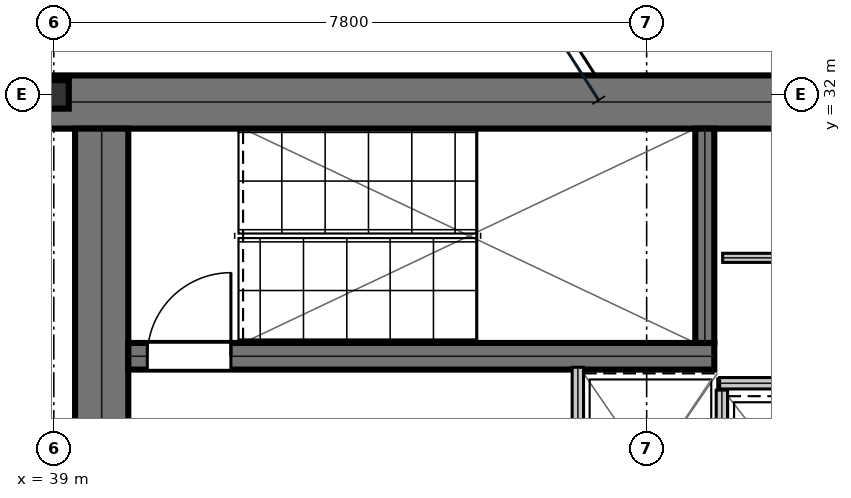
"""IFC4 building model, lengths in metres.
Left out: names, types, materials, properties, quantities, classifications, styles, units other than length and angle.
Written with IfcOpenShell. Run it as: python <this file> out.ifc"""

import sys

from ifc_helpers import new_model, si_unit, direction, frame, frame_2d, origin, origin_2d, place, context, subcontext, project, spatial, rectangle, i_section, extrude, element, fill, save


model = new_model("IFC4")
c1 = context("Model", 3, precision=1e-05, world=origin(), true_north=direction((0.0, 1.0)))
c2 = subcontext(c1, "Body", "Model", "MODEL_VIEW")
j1 = project(units=[si_unit("LENGTHUNIT", "METRE"), si_unit("PLANEANGLEUNIT", "RADIAN")], contexts=[c1])
p1 = place(None, origin())
s1 = spatial("IfcSite", under=j1, at=p1, CompositionType="ELEMENT")
p2 = place(p1, origin())
s2 = spatial("IfcBuilding", under=s1, at=p2, CompositionType="ELEMENT")
p3 = place(p2, frame((0.0, 0.0, 195.9)))
s3 = spatial("IfcBuildingStorey", under=s2, at=p3, CompositionType="ELEMENT", Elevation=195.9)
p4 = place(p3, frame((38.8, 31.9, 0.0), z_axis=(0.0, 0.0, 1.0), x_axis=(1.0, 0.0, 0.0)))
e1 = element("IfcWall", 1, at=p4, inside=s3, PredefinedType="SHEAR", context=c2, shape_type="SweptSolid", body=[
    extrude(rectangle(XDim=16.0, YDim=0.7, at=frame_2d((8.0, 0.0))), origin(), (0.0, 0.0, 1.0), 3.79),
])
p5 = place(p3, frame((39.63, 25.4, 0.0), z_axis=(0.0, 0.0, 1.0), x_axis=(0.0, 1.0, 0.0)))
e2 = element("IfcWall", 2, at=p5, inside=s3, PredefinedType="SHEAR", context=c2, shape_type="SweptSolid", body=[
    extrude(rectangle(XDim=6.15, YDim=0.7, at=frame_2d((3.075, 0.0))), origin(), (0.0, 0.0, 1.0), 3.79),
])
p6 = place(p3, frame((39.98, 28.555, 0.0), z_axis=(0.0, 0.0, 1.0), x_axis=(1.0, 0.0, 0.0)))
e3 = element("IfcWall", 3, at=p6, inside=s3, PredefinedType="SHEAR", context=c2, shape_type="SweptSolid", body=[
    extrude(rectangle(XDim=7.71, YDim=0.35, at=frame_2d((3.855, 0.0))), origin(), (0.0, 0.0, 1.0), 3.79),
])
p7 = place(p6, frame((0.25, 0.0, 0.0)))
e4 = element("IfcOpeningElement", 4, at=p7, cuts=e3, PredefinedType="OPENING", context=c2, shape_type="SweptSolid", body=[
    extrude(rectangle(XDim=1.1, YDim=2.15, at=frame_2d((0.55, 1.075))), frame((0.0, 0.185, 0.0), z_axis=(0.0, -1.0, 0.0), x_axis=(1.0, 0.0, 0.0)), (0.0, 0.0, 1.0), 0.37),
])
p8 = place(p3, frame((47.565, 28.73, 0.0), z_axis=(0.0, 0.0, 1.0), x_axis=(0.0, 1.0, 0.0)))
e5 = element("IfcWall", 5, at=p8, inside=s3, PredefinedType="SHEAR", context=c2, shape_type="SweptSolid", body=[
    extrude(rectangle(XDim=2.82, YDim=0.25, at=frame_2d((1.41, 0.0))), origin(), (0.0, 0.0, 1.0), 3.79),
])
p9 = place(p3, frame((39.0, 32.0, 0.0), z_axis=(0.0, 0.0, 1.0), x_axis=(1.0, 0.0, 0.0)))
e6 = element("IfcColumn", 6, at=p9, inside=s3, PredefinedType="COLUMN", context=c2, shape_type="SweptSolid", body=[
    extrude(i_section(OverallWidth=0.394, OverallDepth=0.375, WebThickness=0.017, FlangeThickness=0.028, at=origin_2d()), origin(), (0.0, 0.0, 1.0), 4.044),
])
p10 = place(p3, frame((45.895, 25.69, 0.0), z_axis=(0.0, 0.0, 1.0), x_axis=(0.0, 1.0, 0.0)))
e7 = element("IfcWall", 7, at=p10, inside=s3, PredefinedType="PARTITIONING", context=c2, shape_type="SweptSolid", body=[
    extrude(rectangle(XDim=2.72, YDim=0.15, at=frame_2d((1.36, 0.0))), origin(), (0.0, 0.0, 1.0), 3.79),
])
p11 = place(p10, frame((0.81, 0.0, 0.0)))
e8 = element("IfcOpeningElement", 8, at=p11, cuts=e7, PredefinedType="OPENING", context=c2, shape_type="SweptSolid", body=[
    extrude(rectangle(XDim=1.1, YDim=2.15, at=frame_2d((0.55, 1.075))), frame((0.0, 0.085, 0.0), z_axis=(0.0, -1.0, 0.0), x_axis=(1.0, 0.0, 0.0)), (0.0, 0.0, 1.0), 0.17),
])
p12 = place(p3, frame((47.79, 25.695, 0.0), z_axis=(0.0, 0.0, 1.0), x_axis=(0.0, 1.0, 0.0)))
e9 = element("IfcWall", 9, at=p12, inside=s3, PredefinedType="PARTITIONING", context=c2, shape_type="SweptSolid", body=[
    extrude(rectangle(XDim=2.415, YDim=0.15, at=frame_2d((1.208, 0.0))), origin(), (0.0, 0.0, 1.0), 3.79),
])
p13 = place(p3, frame((47.76, 28.2, 0.0), z_axis=(0.0, 0.0, 1.0), x_axis=(1.0, 0.0, 0.0)))
e10 = element("IfcWall", 10, at=p13, inside=s3, PredefinedType="PARTITIONING", context=c2, shape_type="SweptSolid", body=[
    extrude(rectangle(XDim=2.04, YDim=0.15, at=frame_2d((1.02, 0.0))), origin(), (0.0, 0.0, 1.0), 3.79),
])
p14 = place(p3, frame((47.8, 29.85, 0.0), z_axis=(0.0, 0.0, 1.0), x_axis=(1.0, 0.0, 0.0)))
e11 = element("IfcWall", 11, at=p14, inside=s3, PredefinedType="PARTITIONING", context=c2, shape_type="SweptSolid", body=[
    extrude(rectangle(XDim=5.86, YDim=0.12, at=frame_2d((2.93, 0.0))), origin(), (0.0, 0.0, 1.0), 3.79),
])
p15 = place(p14, frame((2.6, 0.0, 0.0)))
e12 = element("IfcOpeningElement", 12, at=p15, cuts=e11, PredefinedType="OPENING", context=c2, shape_type="SweptSolid", body=[
    extrude(rectangle(XDim=0.85, YDim=2.15, at=frame_2d((0.425, 1.075))), frame((0.0, 0.07, 0.0), z_axis=(0.0, -1.0, 0.0), x_axis=(1.0, 0.0, 0.0)), (0.0, 0.0, 1.0), 0.14),
])
p16 = place(p7, origin())
e13 = element("IfcDoor", 13, at=p16, inside=s3, OperationType="SINGLE_SWING_RIGHT", PredefinedType="DOOR", context=c2, shape_type="SweptSolid", body=[
    extrude(rectangle(XDim=1.1, YDim=2.15, at=frame_2d((0.55, 1.075))), frame((0.0, 0.025, 0.0), z_axis=(0.0, -1.0, 0.0), x_axis=(1.0, 0.0, 0.0)), (0.0, 0.0, 1.0), 0.05),
])
fill(e4, e13)
save(model, sys.argv[1])
